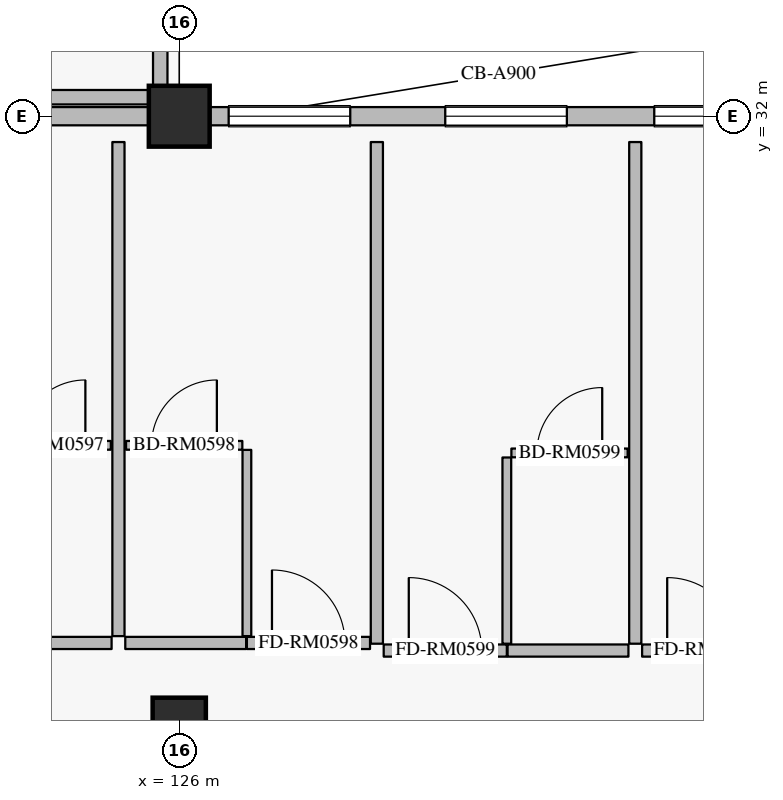
"""IFC4 building model, lengths in metres.
Left out: names, types, materials, properties, quantities, classifications, styles, units other than length and angle.
Written with IfcOpenShell. Run it as: python <this file> out.ifc"""

import sys

from ifc_helpers import new_model, si_unit, direction, frame, frame_2d, origin, origin_2d, place, context, subcontext, project, spatial, rectangle, extrude, element, fill, save


model = new_model("IFC4")
c1 = context("Model", 3, precision=1e-05, world=origin(), true_north=direction((0.0, 1.0)))
c2 = subcontext(c1, "Body", "Model", "MODEL_VIEW")
j1 = project(units=[si_unit("LENGTHUNIT", "METRE"), si_unit("PLANEANGLEUNIT", "RADIAN")], contexts=[c1])
p1 = place(None, origin())
s1 = spatial("IfcSite", under=j1, at=p1, CompositionType="ELEMENT")
p2 = place(p1, origin())
s2 = spatial("IfcBuilding", under=s1, at=p2, CompositionType="ELEMENT")
p3 = place(p2, frame((0.0, 0.0, 21.0)))
s3 = spatial("IfcBuildingStorey", under=s2, at=p3, CompositionType="ELEMENT", Elevation=21.0)
p4 = place(p3, frame((126.0, 32.0, 0.0), z_axis=(0.0, 0.0, 1.0), x_axis=(1.0, 0.0, 0.0)))
e1 = element("IfcColumn", 1, at=p4, inside=s3, PredefinedType="COLUMN", context=c2, shape_type="SweptSolid", body=[
    extrude(rectangle(XDim=0.8, YDim=0.8, at=origin_2d()), origin(), (0.0, 0.0, 1.0), 4.2),
])
p5 = place(p3, frame((126.0, 24.0, 0.0), z_axis=(0.0, 0.0, 1.0), x_axis=(1.0, 0.0, 0.0)))
e2 = element("IfcColumn", 2, at=p5, inside=s3, PredefinedType="COLUMN", context=c2, shape_type="SweptSolid", body=[
    extrude(rectangle(XDim=0.7, YDim=0.7, at=origin_2d()), origin(), (0.0, 0.0, 1.0), 4.2),
])
p6 = place(p3, frame((118.0, 32.0, 0.0), z_axis=(0.0, 0.0, 1.0), x_axis=(1.0, 0.0, 0.0)))
e3 = element("IfcWall", 3, at=p6, inside=s3, PredefinedType="SOLIDWALL", context=c2, shape_type="SweptSolid", body=[
    extrude(rectangle(XDim=7.6, YDim=0.24, at=frame_2d((3.8, 0.0))), origin(), (0.0, 0.0, 1.0), 3.53),
])
p7 = place(p6, frame((1.3, 0.0, 0.8)))
e4 = element("IfcOpeningElement", 4, at=p7, cuts=e3, PredefinedType="OPENING", context=c2, shape_type="SweptSolid", body=[
    extrude(rectangle(XDim=1.6, YDim=1.6, at=frame_2d((0.8, 0.8))), frame((0.0, 0.13, 0.0), z_axis=(0.0, -1.0, 0.0), x_axis=(1.0, 0.0, 0.0)), (0.0, 0.0, 1.0), 0.26),
])
p8 = place(p6, frame((4.7, 0.0, 0.8)))
e5 = element("IfcOpeningElement", 5, at=p8, cuts=e3, PredefinedType="OPENING", context=c2, shape_type="SweptSolid", body=[
    extrude(rectangle(XDim=1.6, YDim=1.6, at=frame_2d((0.8, 0.8))), frame((0.0, 0.13, 0.0), z_axis=(0.0, -1.0, 0.0), x_axis=(1.0, 0.0, 0.0)), (0.0, 0.0, 1.0), 0.26),
])
p9 = place(p3, frame((126.4, 32.0, 0.0), z_axis=(0.0, 0.0, 1.0), x_axis=(1.0, 0.0, 0.0)))
e6 = element("IfcWall", 6, at=p9, inside=s3, PredefinedType="SOLIDWALL", context=c2, shape_type="SweptSolid", body=[
    extrude(rectangle(XDim=7.6, YDim=0.24, at=frame_2d((3.8, 0.0))), origin(), (0.0, 0.0, 1.0), 3.53),
])
p10 = place(p9, frame((0.25, 0.0, 0.8)))
e7 = element("IfcOpeningElement", 7, at=p10, cuts=e6, PredefinedType="OPENING", context=c2, shape_type="SweptSolid", body=[
    extrude(rectangle(XDim=1.6, YDim=1.6, at=frame_2d((0.8, 0.8))), frame((0.0, 0.13, 0.0), z_axis=(0.0, -1.0, 0.0), x_axis=(1.0, 0.0, 0.0)), (0.0, 0.0, 1.0), 0.26),
])
p11 = place(p9, frame((3.1, 0.0, 0.8)))
e8 = element("IfcOpeningElement", 8, at=p11, cuts=e6, PredefinedType="OPENING", context=c2, shape_type="SweptSolid", body=[
    extrude(rectangle(XDim=1.6, YDim=1.6, at=frame_2d((0.8, 0.8))), frame((0.0, 0.13, 0.0), z_axis=(0.0, -1.0, 0.0), x_axis=(1.0, 0.0, 0.0)), (0.0, 0.0, 1.0), 0.26),
])
p12 = place(p9, frame((5.85, 0.0, 0.8)))
e9 = element("IfcOpeningElement", 9, at=p12, cuts=e6, PredefinedType="OPENING", context=c2, shape_type="SweptSolid", body=[
    extrude(rectangle(XDim=1.6, YDim=1.6, at=frame_2d((0.8, 0.8))), frame((0.0, 0.13, 0.0), z_axis=(0.0, -1.0, 0.0), x_axis=(1.0, 0.0, 0.0)), (0.0, 0.0, 1.0), 0.26),
])
p13 = place(p3, frame((125.75, 71.61, 0.0), z_axis=(0.0, 0.0, 1.0), x_axis=(0.0, -1.0, 0.0)))
e10 = element("IfcWall", 10, at=p13, inside=s3, PredefinedType="PARAPET", context=c2, shape_type="SweptSolid", body=[
    extrude(rectangle(XDim=39.22, YDim=0.19, at=frame_2d((19.61, 0.0))), origin(), (0.0, 0.0, 1.0), 1.2),
])
p14 = place(p3, frame((125.61, 32.25, 0.0), z_axis=(0.0, 0.0, 1.0), x_axis=(-1.0, 0.0, 0.0)))
e11 = element("IfcWall", 11, at=p14, inside=s3, PredefinedType="PARAPET", context=c2, shape_type="SweptSolid", body=[
    extrude(rectangle(XDim=7.37, YDim=0.19, at=frame_2d((3.685, 0.0))), origin(), (0.0, 0.0, 1.0), 1.2),
])
p15 = place(p3, frame((123.52, 25.07, 0.0), z_axis=(0.0, 0.0, 1.0), x_axis=(1.0, 0.0, 0.0)))
e12 = element("IfcWall", 12, at=p15, inside=s3, PredefinedType="PARTITIONING", context=c2, shape_type="SweptSolid", body=[
    extrude(rectangle(XDim=1.59, YDim=0.16, at=frame_2d((0.795, 0.0))), origin(), (0.0, 0.0, 1.0), 3.965),
])
p16 = place(p3, frame((123.57, 27.67, 0.0), z_axis=(0.0, 0.0, 1.0), x_axis=(1.0, 0.0, 0.0)))
e13 = element("IfcWall", 13, at=p16, inside=s3, PredefinedType="PARTITIONING", context=c2, shape_type="SweptSolid", body=[
    extrude(rectangle(XDim=1.53, YDim=0.115, at=frame_2d((0.765, 0.0))), origin(), (0.0, 0.0, 1.0), 3.965),
])
p17 = place(p16, frame((0.335, 0.0, 0.0)))
e14 = element("IfcOpeningElement", 14, at=p17, cuts=e13, PredefinedType="OPENING", context=c2, shape_type="SweptSolid", body=[
    extrude(rectangle(XDim=0.86, YDim=2.12, at=frame_2d((0.43, 1.06))), frame((0.0, 0.067, 0.0), z_axis=(0.0, -1.0, 0.0), x_axis=(1.0, 0.0, 0.0)), (0.0, 0.0, 1.0), 0.135),
])
p18 = place(p3, frame((125.29, 25.07, 0.0), z_axis=(0.0, 0.0, 1.0), x_axis=(1.0, 0.0, 0.0)))
e15 = element("IfcWall", 15, at=p18, inside=s3, PredefinedType="PARTITIONING", context=c2, shape_type="SweptSolid", body=[
    extrude(rectangle(XDim=1.59, YDim=0.16, at=frame_2d((0.795, 0.0))), origin(), (0.0, 0.0, 1.0), 3.965),
])
p19 = place(p3, frame((126.89, 25.07, 0.0), z_axis=(0.0, 0.0, 1.0), x_axis=(1.0, 0.0, 0.0)))
e16 = element("IfcWall", 16, at=p19, inside=s3, PredefinedType="PARTITIONING", context=c2, shape_type="SweptSolid", body=[
    extrude(rectangle(XDim=1.62, YDim=0.16, at=frame_2d((0.81, 0.0))), origin(), (0.0, 0.0, 1.0), 3.965),
])
p20 = place(p19, frame((0.33, 0.0, 0.0)))
e17 = element("IfcOpeningElement", 17, at=p20, cuts=e16, PredefinedType="OPENING", context=c2, shape_type="SweptSolid", body=[
    extrude(rectangle(XDim=0.96, YDim=2.2, at=frame_2d((0.48, 1.1))), frame((0.0, 0.09, 0.0), z_axis=(0.0, -1.0, 0.0), x_axis=(1.0, 0.0, 0.0)), (0.0, 0.0, 1.0), 0.18),
])
p21 = place(p3, frame((126.89, 25.16, 0.0), z_axis=(0.0, 0.0, 1.0), x_axis=(0.0, 1.0, 0.0)))
e18 = element("IfcWall", 18, at=p21, inside=s3, PredefinedType="PARTITIONING", context=c2, shape_type="SweptSolid", body=[
    extrude(rectangle(XDim=2.45, YDim=0.115, at=frame_2d((1.225, 0.0))), origin(), (0.0, 0.0, 1.0), 3.965),
])
p22 = place(p3, frame((125.3, 27.67, 0.0), z_axis=(0.0, 0.0, 1.0), x_axis=(1.0, 0.0, 0.0)))
e19 = element("IfcWall", 19, at=p22, inside=s3, PredefinedType="PARTITIONING", context=c2, shape_type="SweptSolid", body=[
    extrude(rectangle(XDim=1.53, YDim=0.115, at=frame_2d((0.765, 0.0))), origin(), (0.0, 0.0, 1.0), 3.965),
])
p23 = place(p22, frame((0.335, 0.0, 0.0)))
e20 = element("IfcOpeningElement", 20, at=p23, cuts=e19, PredefinedType="OPENING", context=c2, shape_type="SweptSolid", body=[
    extrude(rectangle(XDim=0.86, YDim=2.12, at=frame_2d((0.43, 1.06))), frame((0.0, 0.067, 0.0), z_axis=(0.0, -1.0, 0.0), x_axis=(1.0, 0.0, 0.0)), (0.0, 0.0, 1.0), 0.135),
])
p24 = place(p3, frame((125.2, 25.16, 0.0), z_axis=(0.0, 0.0, 1.0), x_axis=(0.0, 1.0, 0.0)))
e21 = element("IfcWall", 21, at=p24, inside=s3, PredefinedType="PARTITIONING", context=c2, shape_type="SweptSolid", body=[
    extrude(rectangle(XDim=6.5, YDim=0.16, at=frame_2d((3.25, 0.0))), origin(), (0.0, 0.0, 1.0), 3.965),
])
p25 = place(p3, frame((128.69, 24.97, 0.0), z_axis=(0.0, 0.0, 1.0), x_axis=(1.0, 0.0, 0.0)))
e22 = element("IfcWall", 22, at=p25, inside=s3, PredefinedType="PARTITIONING", context=c2, shape_type="SweptSolid", body=[
    extrude(rectangle(XDim=1.62, YDim=0.16, at=frame_2d((0.81, 0.0))), origin(), (0.0, 0.0, 1.0), 3.965),
])
p26 = place(p25, frame((0.33, 0.0, 0.0)))
e23 = element("IfcOpeningElement", 23, at=p26, cuts=e22, PredefinedType="OPENING", context=c2, shape_type="SweptSolid", body=[
    extrude(rectangle(XDim=0.96, YDim=2.2, at=frame_2d((0.48, 1.1))), frame((0.0, 0.09, 0.0), z_axis=(0.0, -1.0, 0.0), x_axis=(1.0, 0.0, 0.0)), (0.0, 0.0, 1.0), 0.18),
])
p27 = place(p3, frame((130.32, 24.97, 0.0), z_axis=(0.0, 0.0, 1.0), x_axis=(1.0, 0.0, 0.0)))
e24 = element("IfcWall", 24, at=p27, inside=s3, PredefinedType="PARTITIONING", context=c2, shape_type="SweptSolid", body=[
    extrude(rectangle(XDim=1.59, YDim=0.16, at=frame_2d((0.795, 0.0))), origin(), (0.0, 0.0, 1.0), 3.965),
])
p28 = place(p3, frame((130.31, 25.06, 0.0), z_axis=(0.0, 0.0, 1.0), x_axis=(0.0, 1.0, 0.0)))
e25 = element("IfcWall", 25, at=p28, inside=s3, PredefinedType="PARTITIONING", context=c2, shape_type="SweptSolid", body=[
    extrude(rectangle(XDim=2.45, YDim=0.115, at=frame_2d((1.225, 0.0))), origin(), (0.0, 0.0, 1.0), 3.965),
])
p29 = place(p3, frame((130.37, 27.57, 0.0), z_axis=(0.0, 0.0, 1.0), x_axis=(1.0, 0.0, 0.0)))
e26 = element("IfcWall", 26, at=p29, inside=s3, PredefinedType="PARTITIONING", context=c2, shape_type="SweptSolid", body=[
    extrude(rectangle(XDim=1.53, YDim=0.115, at=frame_2d((0.765, 0.0))), origin(), (0.0, 0.0, 1.0), 3.965),
])
p30 = place(p29, frame((0.335, 0.0, 0.0)))
e27 = element("IfcOpeningElement", 27, at=p30, cuts=e26, PredefinedType="OPENING", context=c2, shape_type="SweptSolid", body=[
    extrude(rectangle(XDim=0.86, YDim=2.12, at=frame_2d((0.43, 1.06))), frame((0.0, 0.067, 0.0), z_axis=(0.0, -1.0, 0.0), x_axis=(1.0, 0.0, 0.0)), (0.0, 0.0, 1.0), 0.135),
])
p31 = place(p3, frame((128.6, 25.06, 0.0), z_axis=(0.0, 0.0, 1.0), x_axis=(0.0, 1.0, 0.0)))
e28 = element("IfcWall", 28, at=p31, inside=s3, PredefinedType="PARTITIONING", context=c2, shape_type="SweptSolid", body=[
    extrude(rectangle(XDim=6.6, YDim=0.16, at=frame_2d((3.3, 0.0))), origin(), (0.0, 0.0, 1.0), 3.965),
])
p32 = place(p3, frame((132.09, 24.97, 0.0), z_axis=(0.0, 0.0, 1.0), x_axis=(1.0, 0.0, 0.0)))
e29 = element("IfcWall", 29, at=p32, inside=s3, PredefinedType="PARTITIONING", context=c2, shape_type="SweptSolid", body=[
    extrude(rectangle(XDim=1.62, YDim=0.16, at=frame_2d((0.81, 0.0))), origin(), (0.0, 0.0, 1.0), 3.965),
])
p33 = place(p32, frame((0.33, 0.0, 0.0)))
e30 = element("IfcOpeningElement", 30, at=p33, cuts=e29, PredefinedType="OPENING", context=c2, shape_type="SweptSolid", body=[
    extrude(rectangle(XDim=0.96, YDim=2.2, at=frame_2d((0.48, 1.1))), frame((0.0, 0.09, 0.0), z_axis=(0.0, -1.0, 0.0), x_axis=(1.0, 0.0, 0.0)), (0.0, 0.0, 1.0), 0.18),
])
p34 = place(p3, frame((132.0, 25.06, 0.0), z_axis=(0.0, 0.0, 1.0), x_axis=(0.0, 1.0, 0.0)))
e31 = element("IfcWall", 31, at=p34, inside=s3, PredefinedType="PARTITIONING", context=c2, shape_type="SweptSolid", body=[
    extrude(rectangle(XDim=6.6, YDim=0.16, at=frame_2d((3.3, 0.0))), origin(), (0.0, 0.0, 1.0), 3.965),
])
p35 = place(p10, origin())
e32 = element("IfcWindow", 32, at=p35, inside=s3, PartitioningType="SINGLE_PANEL", PredefinedType="WINDOW", context=c2, shape_type="SweptSolid", body=[
    extrude(rectangle(XDim=1.6, YDim=1.6, at=frame_2d((0.8, 0.8))), frame((0.0, 0.03, 0.0), z_axis=(0.0, -1.0, 0.0), x_axis=(1.0, 0.0, 0.0)), (0.0, 0.0, 1.0), 0.06),
])
fill(e7, e32)
p36 = place(p11, origin())
e33 = element("IfcWindow", 33, at=p36, inside=s3, PartitioningType="SINGLE_PANEL", PredefinedType="WINDOW", context=c2, shape_type="SweptSolid", body=[
    extrude(rectangle(XDim=1.6, YDim=1.6, at=frame_2d((0.8, 0.8))), frame((0.0, 0.03, 0.0), z_axis=(0.0, -1.0, 0.0), x_axis=(1.0, 0.0, 0.0)), (0.0, 0.0, 1.0), 0.06),
])
fill(e8, e33)
p37 = place(p12, origin())
e34 = element("IfcWindow", 34, at=p37, inside=s3, PartitioningType="SINGLE_PANEL", PredefinedType="WINDOW", context=c2, shape_type="SweptSolid", body=[
    extrude(rectangle(XDim=1.6, YDim=1.6, at=frame_2d((0.8, 0.8))), frame((0.0, 0.03, 0.0), z_axis=(0.0, -1.0, 0.0), x_axis=(1.0, 0.0, 0.0)), (0.0, 0.0, 1.0), 0.06),
])
fill(e9, e34)
p38 = place(p17, origin())
e35 = element("IfcDoor", 35, at=p38, inside=s3, OperationType="SINGLE_SWING_RIGHT", PredefinedType="DOOR", context=c2, shape_type="SweptSolid", body=[
    extrude(rectangle(XDim=0.86, YDim=2.12, at=frame_2d((0.43, 1.06))), frame((0.0, 0.025, 0.0), z_axis=(0.0, -1.0, 0.0), x_axis=(1.0, 0.0, 0.0)), (0.0, 0.0, 1.0), 0.05),
])
fill(e14, e35)
p39 = place(p20, origin())
e36 = element("IfcDoor", 36, at=p39, inside=s3, OperationType="SINGLE_SWING_LEFT", PredefinedType="DOOR", context=c2, shape_type="SweptSolid", body=[
    extrude(rectangle(XDim=0.96, YDim=2.2, at=frame_2d((0.48, 1.1))), frame((0.0, 0.025, 0.0), z_axis=(0.0, -1.0, 0.0), x_axis=(1.0, 0.0, 0.0)), (0.0, 0.0, 1.0), 0.05),
])
fill(e17, e36)
p40 = place(p23, origin())
e37 = element("IfcDoor", 37, at=p40, inside=s3, OperationType="SINGLE_SWING_RIGHT", PredefinedType="DOOR", context=c2, shape_type="SweptSolid", body=[
    extrude(rectangle(XDim=0.86, YDim=2.12, at=frame_2d((0.43, 1.06))), frame((0.0, 0.025, 0.0), z_axis=(0.0, -1.0, 0.0), x_axis=(1.0, 0.0, 0.0)), (0.0, 0.0, 1.0), 0.05),
])
fill(e20, e37)
p41 = place(p26, origin())
e38 = element("IfcDoor", 38, at=p41, inside=s3, OperationType="SINGLE_SWING_LEFT", PredefinedType="DOOR", context=c2, shape_type="SweptSolid", body=[
    extrude(rectangle(XDim=0.96, YDim=2.2, at=frame_2d((0.48, 1.1))), frame((0.0, 0.025, 0.0), z_axis=(0.0, -1.0, 0.0), x_axis=(1.0, 0.0, 0.0)), (0.0, 0.0, 1.0), 0.05),
])
fill(e23, e38)
p42 = place(p30, origin())
e39 = element("IfcDoor", 39, at=p42, inside=s3, OperationType="SINGLE_SWING_RIGHT", PredefinedType="DOOR", context=c2, shape_type="SweptSolid", body=[
    extrude(rectangle(XDim=0.86, YDim=2.12, at=frame_2d((0.43, 1.06))), frame((0.0, 0.025, 0.0), z_axis=(0.0, -1.0, 0.0), x_axis=(1.0, 0.0, 0.0)), (0.0, 0.0, 1.0), 0.05),
])
fill(e27, e39)
p43 = place(p33, origin())
e40 = element("IfcDoor", 40, at=p43, inside=s3, OperationType="SINGLE_SWING_LEFT", PredefinedType="DOOR", context=c2, shape_type="SweptSolid", body=[
    extrude(rectangle(XDim=0.96, YDim=2.2, at=frame_2d((0.48, 1.1))), frame((0.0, 0.025, 0.0), z_axis=(0.0, -1.0, 0.0), x_axis=(1.0, 0.0, 0.0)), (0.0, 0.0, 1.0), 0.05),
])
fill(e30, e40)
save(model, sys.argv[1])
